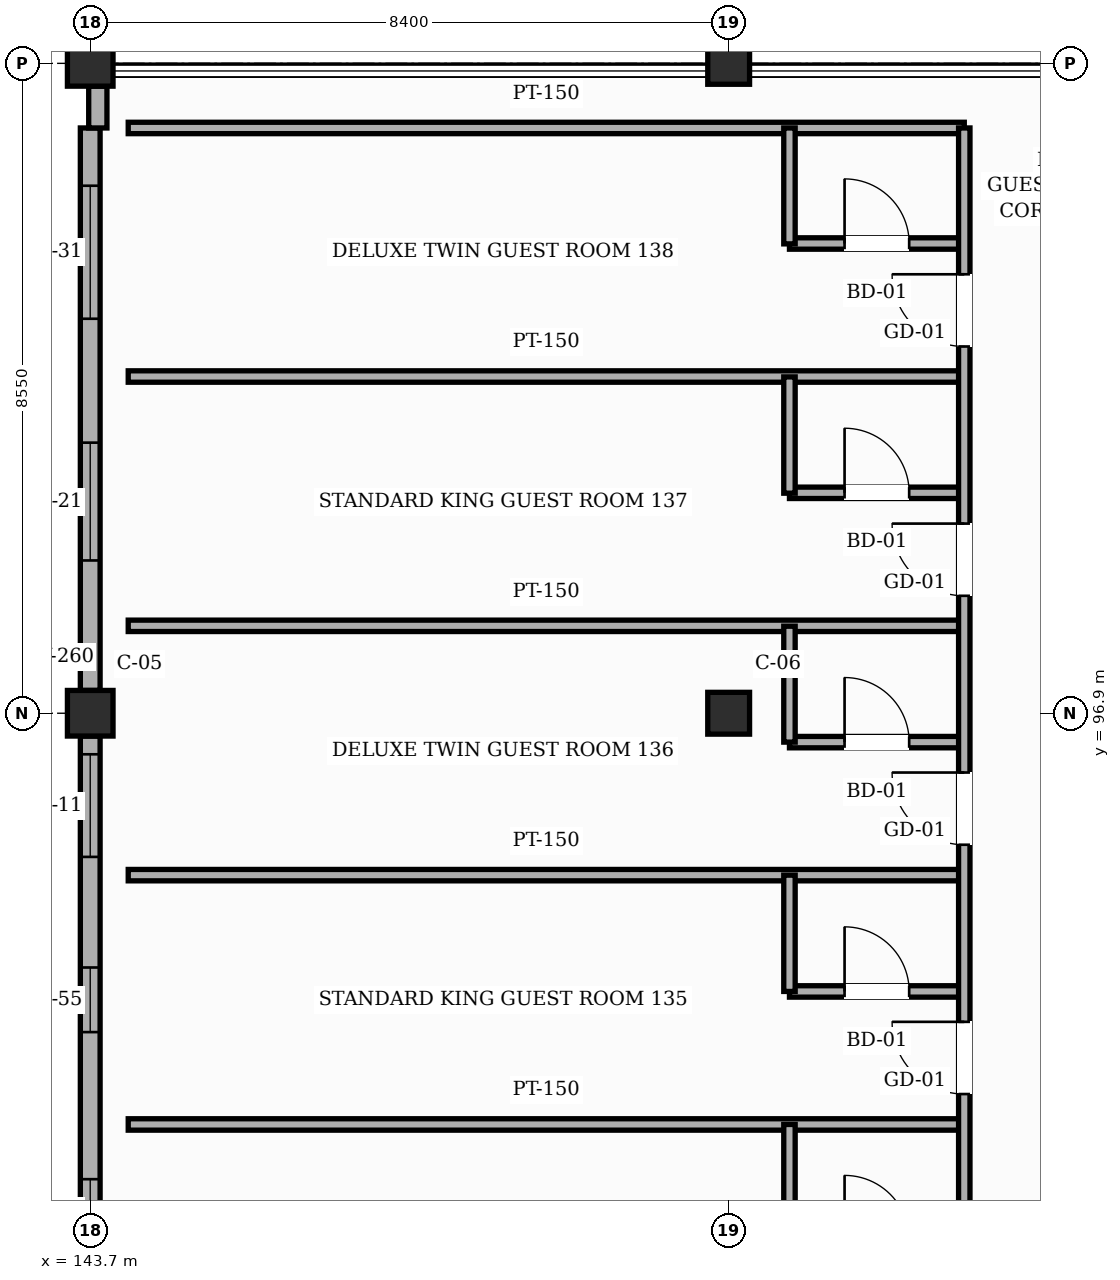
"""IFC4 building model, lengths in metres.
Left out: names, types, materials, properties, quantities, classifications, styles, units other than length and angle.
Written with IfcOpenShell. Run it as: python <this file> out.ifc"""

import sys

from ifc_helpers import new_model, si_unit, direction, frame, frame_2d, origin, origin_2d, place, context, subcontext, project, spatial, rectangle, hollow_rectangle, extrude, element, fill, save


model = new_model("IFC4")
c1 = context("Model", 3, precision=1e-05, world=origin(), true_north=direction((0.0, 1.0)))
c2 = subcontext(c1, "Body", "Model", "MODEL_VIEW")
j1 = project(units=[si_unit("LENGTHUNIT", "METRE"), si_unit("PLANEANGLEUNIT", "RADIAN")], contexts=[c1])
p1 = place(None, origin())
s1 = spatial("IfcSite", under=j1, at=p1, CompositionType="ELEMENT")
p2 = place(p1, origin())
s2 = spatial("IfcBuilding", under=s1, at=p2, CompositionType="ELEMENT")
p3 = place(p2, frame((0.0, 0.0, 28.2)))
s3 = spatial("IfcBuildingStorey", under=s2, at=p3, CompositionType="ELEMENT", Elevation=28.2)
p4 = place(p3, frame((143.7, 96.9, 0.0), z_axis=(0.0, 0.0, 1.0), x_axis=(1.0, 0.0, 0.0)))
e1 = element("IfcColumn", 1, at=p4, inside=s3, PredefinedType="COLUMN", context=c2, shape_type="SweptSolid", body=[
    extrude(hollow_rectangle(XDim=0.6, YDim=0.6, WallThickness=0.025, InnerFilletRadius=0.025, OuterFilletRadius=0.05, at=origin_2d()), origin(), (0.0, 0.0, 1.0), 3.6),
])
p5 = place(p3, frame((143.7, 105.45, 0.0), z_axis=(0.0, 0.0, 1.0), x_axis=(1.0, 0.0, 0.0)))
e2 = element("IfcColumn", 2, at=p5, inside=s3, PredefinedType="COLUMN", context=c2, shape_type="SweptSolid", body=[
    extrude(hollow_rectangle(XDim=0.6, YDim=0.6, WallThickness=0.025, InnerFilletRadius=0.025, OuterFilletRadius=0.05, at=origin_2d()), origin(), (0.0, 0.0, 1.0), 3.38),
])
p6 = place(p3, frame((152.1, 96.9, 0.0), z_axis=(0.0, 0.0, 1.0), x_axis=(1.0, 0.0, 0.0)))
e3 = element("IfcColumn", 3, at=p6, inside=s3, PredefinedType="COLUMN", context=c2, shape_type="SweptSolid", body=[
    extrude(hollow_rectangle(XDim=0.55, YDim=0.55, WallThickness=0.022, InnerFilletRadius=0.022, OuterFilletRadius=0.044, at=origin_2d()), origin(), (0.0, 0.0, 1.0), 3.6),
])
p7 = place(p3, frame((152.1, 105.45, 0.0), z_axis=(0.0, 0.0, 1.0), x_axis=(1.0, 0.0, 0.0)))
e4 = element("IfcColumn", 4, at=p7, inside=s3, PredefinedType="COLUMN", context=c2, shape_type="SweptSolid", body=[
    extrude(hollow_rectangle(XDim=0.55, YDim=0.55, WallThickness=0.022, InnerFilletRadius=0.022, OuterFilletRadius=0.044, at=origin_2d()), origin(), (0.0, 0.0, 1.0), 3.38),
])
p8 = place(p3, frame((143.7, 89.2, 0.0), z_axis=(0.0, 0.0, 1.0), x_axis=(0.0, 1.0, 0.0)))
e5 = element("IfcWall", 5, at=p8, inside=s3, PredefinedType="SOLIDWALL", context=c2, shape_type="SweptSolid", body=[
    extrude(rectangle(XDim=7.4, YDim=0.26, at=frame_2d((3.7, 0.0))), origin(), (0.0, 0.0, 1.0), 2.805),
])
p9 = place(p8, frame((0.72, 0.0, 0.85)))
e6 = element("IfcOpeningElement", 6, at=p9, cuts=e5, PredefinedType="OPENING", context=c2, shape_type="SweptSolid", body=[
    extrude(rectangle(XDim=0.85, YDim=1.35, at=frame_2d((0.425, 0.675))), frame((0.0, 0.14, 0.0), z_axis=(0.0, -1.0, 0.0), x_axis=(1.0, 0.0, 0.0)), (0.0, 0.0, 1.0), 0.28),
])
p10 = place(p8, frame((3.505, 0.0, 0.85)))
e7 = element("IfcOpeningElement", 7, at=p10, cuts=e5, PredefinedType="OPENING", context=c2, shape_type="SweptSolid", body=[
    extrude(rectangle(XDim=0.85, YDim=1.35, at=frame_2d((0.425, 0.675))), frame((0.0, 0.14, 0.0), z_axis=(0.0, -1.0, 0.0), x_axis=(1.0, 0.0, 0.0)), (0.0, 0.0, 1.0), 0.28),
])
p11 = place(p8, frame((5.81, 0.0, 0.85)))
e8 = element("IfcOpeningElement", 8, at=p11, cuts=e5, PredefinedType="OPENING", context=c2, shape_type="SweptSolid", body=[
    extrude(rectangle(XDim=1.35, YDim=1.35, at=frame_2d((0.675, 0.675))), frame((0.0, 0.14, 0.0), z_axis=(0.0, -1.0, 0.0), x_axis=(1.0, 0.0, 0.0)), (0.0, 0.0, 1.0), 0.28),
])
p12 = place(p3, frame((143.7, 97.2, 0.0), z_axis=(0.0, 0.0, 1.0), x_axis=(0.0, 1.0, 0.0)))
e9 = element("IfcWall", 9, at=p12, inside=s3, PredefinedType="SOLIDWALL", context=c2, shape_type="SweptSolid", body=[
    extrude(rectangle(XDim=7.4, YDim=0.26, at=frame_2d((3.7, 0.0))), origin(), (0.0, 0.0, 1.0), 2.655),
])
p13 = place(p12, frame((1.71, 0.0, 0.85)))
e10 = element("IfcOpeningElement", 10, at=p13, cuts=e9, PredefinedType="OPENING", context=c2, shape_type="SweptSolid", body=[
    extrude(rectangle(XDim=1.55, YDim=1.35, at=frame_2d((0.775, 0.675))), frame((0.0, 0.14, 0.0), z_axis=(0.0, -1.0, 0.0), x_axis=(1.0, 0.0, 0.0)), (0.0, 0.0, 1.0), 0.28),
])
p14 = place(p12, frame((4.89, 0.0, 0.85)))
e11 = element("IfcOpeningElement", 11, at=p14, cuts=e9, PredefinedType="OPENING", context=c2, shape_type="SweptSolid", body=[
    extrude(rectangle(XDim=1.75, YDim=1.35, at=frame_2d((0.875, 0.675))), frame((0.0, 0.14, 0.0), z_axis=(0.0, -1.0, 0.0), x_axis=(1.0, 0.0, 0.0)), (0.0, 0.0, 1.0), 0.28),
])
p15 = place(p3, frame((143.8, 104.6, 0.0), z_axis=(0.0, 0.0, 1.0), x_axis=(0.0, 1.0, 0.0)))
e12 = element("IfcWall", 12, at=p15, inside=s3, PredefinedType="SOLIDWALL", context=c2, shape_type="SweptSolid", body=[
    extrude(rectangle(XDim=0.55, YDim=0.24, at=frame_2d((0.275, 0.0))), origin(), (0.0, 0.0, 1.0), 2.655),
])
p16 = place(p3, frame((144.2, 91.49, 0.0), z_axis=(0.0, 0.0, 1.0), x_axis=(1.0, 0.0, 0.0)))
e13 = element("IfcWall", 13, at=p16, inside=s3, PredefinedType="PARTITIONING", context=c2, shape_type="SweptSolid", body=[
    extrude(rectangle(XDim=11.0, YDim=0.15, at=frame_2d((5.5, 0.0))), origin(), (0.0, 0.0, 1.0), 3.365),
])
p17 = place(p3, frame((152.9, 93.24, 0.0), z_axis=(0.0, 0.0, 1.0), x_axis=(1.0, 0.0, 0.0)))
e14 = element("IfcWall", 14, at=p17, inside=s3, PredefinedType="PARTITIONING", context=c2, shape_type="SweptSolid", body=[
    extrude(rectangle(XDim=2.3, YDim=0.15, at=frame_2d((1.15, 0.0))), origin(), (0.0, 0.0, 1.0), 3.365),
])
p18 = place(p17, frame((0.725, 0.0, 0.0)))
e15 = element("IfcOpeningElement", 15, at=p18, cuts=e14, PredefinedType="OPENING", context=c2, shape_type="SweptSolid", body=[
    extrude(rectangle(XDim=0.85, YDim=2.1, at=frame_2d((0.425, 1.05))), frame((0.0, 0.085, 0.0), z_axis=(0.0, -1.0, 0.0), x_axis=(1.0, 0.0, 0.0)), (0.0, 0.0, 1.0), 0.17),
])
p19 = place(p3, frame((144.2, 94.77, 0.0), z_axis=(0.0, 0.0, 1.0), x_axis=(1.0, 0.0, 0.0)))
e16 = element("IfcWall", 16, at=p19, inside=s3, PredefinedType="PARTITIONING", context=c2, shape_type="SweptSolid", body=[
    extrude(rectangle(XDim=11.0, YDim=0.15, at=frame_2d((5.5, 0.0))), origin(), (0.0, 0.0, 1.0), 3.365),
])
p20 = place(p3, frame((152.9, 96.52, 0.0), z_axis=(0.0, 0.0, 1.0), x_axis=(1.0, 0.0, 0.0)))
e17 = element("IfcWall", 17, at=p20, inside=s3, PredefinedType="PARTITIONING", context=c2, shape_type="SweptSolid", body=[
    extrude(rectangle(XDim=2.3, YDim=0.15, at=frame_2d((1.15, 0.0))), origin(), (0.0, 0.0, 1.0), 3.365),
])
p21 = place(p20, frame((0.725, 0.0, 0.0)))
e18 = element("IfcOpeningElement", 18, at=p21, cuts=e17, PredefinedType="OPENING", context=c2, shape_type="SweptSolid", body=[
    extrude(rectangle(XDim=0.85, YDim=2.1, at=frame_2d((0.425, 1.05))), frame((0.0, 0.085, 0.0), z_axis=(0.0, -1.0, 0.0), x_axis=(1.0, 0.0, 0.0)), (0.0, 0.0, 1.0), 0.17),
])
p22 = place(p3, frame((144.2, 98.05, 0.0), z_axis=(0.0, 0.0, 1.0), x_axis=(1.0, 0.0, 0.0)))
e19 = element("IfcWall", 19, at=p22, inside=s3, PredefinedType="PARTITIONING", context=c2, shape_type="SweptSolid", body=[
    extrude(rectangle(XDim=11.0, YDim=0.15, at=frame_2d((5.5, 0.0))), origin(), (0.0, 0.0, 1.0), 3.365),
])
p23 = place(p3, frame((152.9, 99.8, 0.0), z_axis=(0.0, 0.0, 1.0), x_axis=(1.0, 0.0, 0.0)))
e20 = element("IfcWall", 20, at=p23, inside=s3, PredefinedType="PARTITIONING", context=c2, shape_type="SweptSolid", body=[
    extrude(rectangle(XDim=2.3, YDim=0.15, at=frame_2d((1.15, 0.0))), origin(), (0.0, 0.0, 1.0), 3.365),
])
p24 = place(p23, frame((0.725, 0.0, 0.0)))
e21 = element("IfcOpeningElement", 21, at=p24, cuts=e20, PredefinedType="OPENING", context=c2, shape_type="SweptSolid", body=[
    extrude(rectangle(XDim=0.85, YDim=2.1, at=frame_2d((0.425, 1.05))), frame((0.0, 0.085, 0.0), z_axis=(0.0, -1.0, 0.0), x_axis=(1.0, 0.0, 0.0)), (0.0, 0.0, 1.0), 0.17),
])
p25 = place(p3, frame((144.2, 101.33, 0.0), z_axis=(0.0, 0.0, 1.0), x_axis=(1.0, 0.0, 0.0)))
e22 = element("IfcWall", 22, at=p25, inside=s3, PredefinedType="PARTITIONING", context=c2, shape_type="SweptSolid", body=[
    extrude(rectangle(XDim=11.0, YDim=0.15, at=frame_2d((5.5, 0.0))), origin(), (0.0, 0.0, 1.0), 3.005),
])
p26 = place(p3, frame((152.9, 103.08, 0.0), z_axis=(0.0, 0.0, 1.0), x_axis=(1.0, 0.0, 0.0)))
e23 = element("IfcWall", 23, at=p26, inside=s3, PredefinedType="PARTITIONING", context=c2, shape_type="SweptSolid", body=[
    extrude(rectangle(XDim=2.3, YDim=0.15, at=frame_2d((1.15, 0.0))), origin(), (0.0, 0.0, 1.0), 3.365),
])
p27 = place(p26, frame((0.725, 0.0, 0.0)))
e24 = element("IfcOpeningElement", 24, at=p27, cuts=e23, PredefinedType="OPENING", context=c2, shape_type="SweptSolid", body=[
    extrude(rectangle(XDim=0.85, YDim=2.1, at=frame_2d((0.425, 1.05))), frame((0.0, 0.085, 0.0), z_axis=(0.0, -1.0, 0.0), x_axis=(1.0, 0.0, 0.0)), (0.0, 0.0, 1.0), 0.17),
])
p28 = place(p3, frame((144.2, 104.6, 0.0), z_axis=(0.0, 0.0, 1.0), x_axis=(1.0, 0.0, 0.0)))
e25 = element("IfcWall", 25, at=p28, inside=s3, PredefinedType="PARTITIONING", context=c2, shape_type="SweptSolid", body=[
    extrude(rectangle(XDim=11.0, YDim=0.15, at=frame_2d((5.5, 0.0))), origin(), (0.0, 0.0, 1.0), 3.365),
])
p29 = place(p3, frame((152.9, 89.965, 0.0), z_axis=(0.0, 0.0, 1.0), x_axis=(0.0, 1.0, 0.0)))
e26 = element("IfcWall", 26, at=p29, inside=s3, PredefinedType="PARTITIONING", context=c2, shape_type="SweptSolid", body=[
    extrude(rectangle(XDim=1.525, YDim=0.15, at=frame_2d((0.762, 0.0))), origin(), (0.0, 0.0, 1.0), 3.365),
])
p30 = place(p3, frame((152.9, 93.24, 0.0), z_axis=(0.0, 0.0, 1.0), x_axis=(0.0, 1.0, 0.0)))
e27 = element("IfcWall", 27, at=p30, inside=s3, PredefinedType="PARTITIONING", context=c2, shape_type="SweptSolid", body=[
    extrude(rectangle(XDim=1.53, YDim=0.15, at=frame_2d((0.765, 0.0))), origin(), (0.0, 0.0, 1.0), 3.365),
])
p31 = place(p3, frame((152.9, 96.52, 0.0), z_axis=(0.0, 0.0, 1.0), x_axis=(0.0, 1.0, 0.0)))
e28 = element("IfcWall", 28, at=p31, inside=s3, PredefinedType="PARTITIONING", context=c2, shape_type="SweptSolid", body=[
    extrude(rectangle(XDim=1.525, YDim=0.15, at=frame_2d((0.762, 0.0))), origin(), (0.0, 0.0, 1.0), 3.365),
])
p32 = place(p3, frame((152.9, 99.795, 0.0), z_axis=(0.0, 0.0, 1.0), x_axis=(0.0, 1.0, 0.0)))
e29 = element("IfcWall", 29, at=p32, inside=s3, PredefinedType="PARTITIONING", context=c2, shape_type="SweptSolid", body=[
    extrude(rectangle(XDim=1.53, YDim=0.15, at=frame_2d((0.765, 0.0))), origin(), (0.0, 0.0, 1.0), 3.365),
])
p33 = place(p3, frame((152.9, 103.075, 0.0), z_axis=(0.0, 0.0, 1.0), x_axis=(0.0, 1.0, 0.0)))
e30 = element("IfcWall", 30, at=p33, inside=s3, PredefinedType="PARTITIONING", context=c2, shape_type="SweptSolid", body=[
    extrude(rectangle(XDim=1.525, YDim=0.15, at=frame_2d((0.763, 0.0))), origin(), (0.0, 0.0, 1.0), 3.365),
])
p34 = place(p3, frame((155.2, 62.0, 0.0), z_axis=(0.0, 0.0, 1.0), x_axis=(0.0, 1.0, 0.0)))
e31 = element("IfcWall", 31, at=p34, inside=s3, PredefinedType="PARTITIONING", context=c2, shape_type="SweptSolid", body=[
    extrude(rectangle(XDim=42.6, YDim=0.15, at=frame_2d((21.3, 0.0))), origin(), (0.0, 0.0, 1.0), 3.365),
])
p35 = place(p34, frame((0.325, 0.0, 0.0)))
e32 = element("IfcOpeningElement", 32, at=p35, cuts=e31, PredefinedType="OPENING", context=c2, shape_type="SweptSolid", body=[
    extrude(rectangle(XDim=1.1, YDim=2.2, at=frame_2d((0.55, 1.1))), frame((0.0, 0.085, 0.0), z_axis=(0.0, -1.0, 0.0), x_axis=(1.0, 0.0, 0.0)), (0.0, 0.0, 1.0), 0.17),
])
p36 = place(p34, frame((3.675, 0.0, 0.0)))
e33 = element("IfcOpeningElement", 33, at=p36, cuts=e31, PredefinedType="OPENING", context=c2, shape_type="SweptSolid", body=[
    extrude(rectangle(XDim=0.95, YDim=2.15, at=frame_2d((0.475, 1.075))), frame((0.0, 0.085, 0.0), z_axis=(0.0, -1.0, 0.0), x_axis=(1.0, 0.0, 0.0)), (0.0, 0.0, 1.0), 0.17),
])
p37 = place(p34, frame((6.955, 0.0, 0.0)))
e34 = element("IfcOpeningElement", 34, at=p37, cuts=e31, PredefinedType="OPENING", context=c2, shape_type="SweptSolid", body=[
    extrude(rectangle(XDim=0.95, YDim=2.15, at=frame_2d((0.475, 1.075))), frame((0.0, 0.085, 0.0), z_axis=(0.0, -1.0, 0.0), x_axis=(1.0, 0.0, 0.0)), (0.0, 0.0, 1.0), 0.17),
])
p38 = place(p34, frame((10.23, 0.0, 0.0)))
e35 = element("IfcOpeningElement", 35, at=p38, cuts=e31, PredefinedType="OPENING", context=c2, shape_type="SweptSolid", body=[
    extrude(rectangle(XDim=0.95, YDim=2.15, at=frame_2d((0.475, 1.075))), frame((0.0, 0.085, 0.0), z_axis=(0.0, -1.0, 0.0), x_axis=(1.0, 0.0, 0.0)), (0.0, 0.0, 1.0), 0.17),
])
p39 = place(p34, frame((13.51, 0.0, 0.0)))
e36 = element("IfcOpeningElement", 36, at=p39, cuts=e31, PredefinedType="OPENING", context=c2, shape_type="SweptSolid", body=[
    extrude(rectangle(XDim=0.95, YDim=2.15, at=frame_2d((0.475, 1.075))), frame((0.0, 0.085, 0.0), z_axis=(0.0, -1.0, 0.0), x_axis=(1.0, 0.0, 0.0)), (0.0, 0.0, 1.0), 0.17),
])
p40 = place(p34, frame((16.785, 0.0, 0.0)))
e37 = element("IfcOpeningElement", 37, at=p40, cuts=e31, PredefinedType="OPENING", context=c2, shape_type="SweptSolid", body=[
    extrude(rectangle(XDim=0.95, YDim=2.15, at=frame_2d((0.475, 1.075))), frame((0.0, 0.085, 0.0), z_axis=(0.0, -1.0, 0.0), x_axis=(1.0, 0.0, 0.0)), (0.0, 0.0, 1.0), 0.17),
])
p41 = place(p34, frame((20.06, 0.0, 0.0)))
e38 = element("IfcOpeningElement", 38, at=p41, cuts=e31, PredefinedType="OPENING", context=c2, shape_type="SweptSolid", body=[
    extrude(rectangle(XDim=0.95, YDim=2.15, at=frame_2d((0.475, 1.075))), frame((0.0, 0.085, 0.0), z_axis=(0.0, -1.0, 0.0), x_axis=(1.0, 0.0, 0.0)), (0.0, 0.0, 1.0), 0.17),
])
p42 = place(p34, frame((23.34, 0.0, 0.0)))
e39 = element("IfcOpeningElement", 39, at=p42, cuts=e31, PredefinedType="OPENING", context=c2, shape_type="SweptSolid", body=[
    extrude(rectangle(XDim=0.95, YDim=2.15, at=frame_2d((0.475, 1.075))), frame((0.0, 0.085, 0.0), z_axis=(0.0, -1.0, 0.0), x_axis=(1.0, 0.0, 0.0)), (0.0, 0.0, 1.0), 0.17),
])
p43 = place(p34, frame((26.615, 0.0, 0.0)))
e40 = element("IfcOpeningElement", 40, at=p43, cuts=e31, PredefinedType="OPENING", context=c2, shape_type="SweptSolid", body=[
    extrude(rectangle(XDim=0.95, YDim=2.15, at=frame_2d((0.475, 1.075))), frame((0.0, 0.085, 0.0), z_axis=(0.0, -1.0, 0.0), x_axis=(1.0, 0.0, 0.0)), (0.0, 0.0, 1.0), 0.17),
])
p44 = place(p34, frame((29.89, 0.0, 0.0)))
e41 = element("IfcOpeningElement", 41, at=p44, cuts=e31, PredefinedType="OPENING", context=c2, shape_type="SweptSolid", body=[
    extrude(rectangle(XDim=0.95, YDim=2.15, at=frame_2d((0.475, 1.075))), frame((0.0, 0.085, 0.0), z_axis=(0.0, -1.0, 0.0), x_axis=(1.0, 0.0, 0.0)), (0.0, 0.0, 1.0), 0.17),
])
p45 = place(p34, frame((33.17, 0.0, 0.0)))
e42 = element("IfcOpeningElement", 42, at=p45, cuts=e31, PredefinedType="OPENING", context=c2, shape_type="SweptSolid", body=[
    extrude(rectangle(XDim=0.95, YDim=2.15, at=frame_2d((0.475, 1.075))), frame((0.0, 0.085, 0.0), z_axis=(0.0, -1.0, 0.0), x_axis=(1.0, 0.0, 0.0)), (0.0, 0.0, 1.0), 0.17),
])
p46 = place(p34, frame((36.445, 0.0, 0.0)))
e43 = element("IfcOpeningElement", 43, at=p46, cuts=e31, PredefinedType="OPENING", context=c2, shape_type="SweptSolid", body=[
    extrude(rectangle(XDim=0.95, YDim=2.15, at=frame_2d((0.475, 1.075))), frame((0.0, 0.085, 0.0), z_axis=(0.0, -1.0, 0.0), x_axis=(1.0, 0.0, 0.0)), (0.0, 0.0, 1.0), 0.17),
])
p47 = place(p34, frame((39.725, 0.0, 0.0)))
e44 = element("IfcOpeningElement", 44, at=p47, cuts=e31, PredefinedType="OPENING", context=c2, shape_type="SweptSolid", body=[
    extrude(rectangle(XDim=0.95, YDim=2.15, at=frame_2d((0.475, 1.075))), frame((0.0, 0.085, 0.0), z_axis=(0.0, -1.0, 0.0), x_axis=(1.0, 0.0, 0.0)), (0.0, 0.0, 1.0), 0.17),
])
p48 = place(p9, origin())
e45 = element("IfcWindow", 45, at=p48, inside=s3, PartitioningType="SINGLE_PANEL", PredefinedType="WINDOW", context=c2, shape_type="SweptSolid", body=[
    extrude(rectangle(XDim=0.85, YDim=1.35, at=frame_2d((0.425, 0.675))), frame((0.0, 0.03, 0.0), z_axis=(0.0, -1.0, 0.0), x_axis=(1.0, 0.0, 0.0)), (0.0, 0.0, 1.0), 0.06),
])
fill(e6, e45)
p49 = place(p10, origin())
e46 = element("IfcWindow", 46, at=p49, inside=s3, PartitioningType="SINGLE_PANEL", PredefinedType="WINDOW", context=c2, shape_type="SweptSolid", body=[
    extrude(rectangle(XDim=0.85, YDim=1.35, at=frame_2d((0.425, 0.675))), frame((0.0, 0.03, 0.0), z_axis=(0.0, -1.0, 0.0), x_axis=(1.0, 0.0, 0.0)), (0.0, 0.0, 1.0), 0.06),
])
fill(e7, e46)
p50 = place(p11, origin())
e47 = element("IfcWindow", 47, at=p50, inside=s3, PartitioningType="SINGLE_PANEL", PredefinedType="WINDOW", context=c2, shape_type="SweptSolid", body=[
    extrude(rectangle(XDim=1.35, YDim=1.35, at=frame_2d((0.675, 0.675))), frame((0.0, 0.03, 0.0), z_axis=(0.0, -1.0, 0.0), x_axis=(1.0, 0.0, 0.0)), (0.0, 0.0, 1.0), 0.06),
])
fill(e8, e47)
p51 = place(p13, origin())
e48 = element("IfcWindow", 48, at=p51, inside=s3, PartitioningType="SINGLE_PANEL", PredefinedType="WINDOW", context=c2, shape_type="SweptSolid", body=[
    extrude(rectangle(XDim=1.55, YDim=1.35, at=frame_2d((0.775, 0.675))), frame((0.0, 0.03, 0.0), z_axis=(0.0, -1.0, 0.0), x_axis=(1.0, 0.0, 0.0)), (0.0, 0.0, 1.0), 0.06),
])
fill(e10, e48)
p52 = place(p14, origin())
e49 = element("IfcWindow", 49, at=p52, inside=s3, PartitioningType="SINGLE_PANEL", PredefinedType="WINDOW", context=c2, shape_type="SweptSolid", body=[
    extrude(rectangle(XDim=1.75, YDim=1.35, at=frame_2d((0.875, 0.675))), frame((0.0, 0.03, 0.0), z_axis=(0.0, -1.0, 0.0), x_axis=(1.0, 0.0, 0.0)), (0.0, 0.0, 1.0), 0.06),
])
fill(e11, e49)
p53 = place(p44, origin())
e50 = element("IfcDoor", 50, at=p53, inside=s3, OperationType="SINGLE_SWING_RIGHT", PredefinedType="DOOR", context=c2, shape_type="SweptSolid", body=[
    extrude(rectangle(XDim=0.95, YDim=2.15, at=frame_2d((0.475, 1.075))), frame((0.0, 0.025, 0.0), z_axis=(0.0, -1.0, 0.0), x_axis=(1.0, 0.0, 0.0)), (0.0, 0.0, 1.0), 0.05),
])
fill(e41, e50)
p54 = place(p18, origin())
e51 = element("IfcDoor", 51, at=p54, inside=s3, OperationType="SINGLE_SWING_LEFT", PredefinedType="DOOR", context=c2, shape_type="SweptSolid", body=[
    extrude(rectangle(XDim=0.85, YDim=2.1, at=frame_2d((0.425, 1.05))), frame((0.0, 0.025, 0.0), z_axis=(0.0, -1.0, 0.0), x_axis=(1.0, 0.0, 0.0)), (0.0, 0.0, 1.0), 0.05),
])
fill(e15, e51)
p55 = place(p45, origin())
e52 = element("IfcDoor", 52, at=p55, inside=s3, OperationType="SINGLE_SWING_RIGHT", PredefinedType="DOOR", context=c2, shape_type="SweptSolid", body=[
    extrude(rectangle(XDim=0.95, YDim=2.15, at=frame_2d((0.475, 1.075))), frame((0.0, 0.025, 0.0), z_axis=(0.0, -1.0, 0.0), x_axis=(1.0, 0.0, 0.0)), (0.0, 0.0, 1.0), 0.05),
])
fill(e42, e52)
p56 = place(p21, origin())
e53 = element("IfcDoor", 53, at=p56, inside=s3, OperationType="SINGLE_SWING_LEFT", PredefinedType="DOOR", context=c2, shape_type="SweptSolid", body=[
    extrude(rectangle(XDim=0.85, YDim=2.1, at=frame_2d((0.425, 1.05))), frame((0.0, 0.025, 0.0), z_axis=(0.0, -1.0, 0.0), x_axis=(1.0, 0.0, 0.0)), (0.0, 0.0, 1.0), 0.05),
])
fill(e18, e53)
p57 = place(p46, origin())
e54 = element("IfcDoor", 54, at=p57, inside=s3, OperationType="SINGLE_SWING_RIGHT", PredefinedType="DOOR", context=c2, shape_type="SweptSolid", body=[
    extrude(rectangle(XDim=0.95, YDim=2.15, at=frame_2d((0.475, 1.075))), frame((0.0, 0.025, 0.0), z_axis=(0.0, -1.0, 0.0), x_axis=(1.0, 0.0, 0.0)), (0.0, 0.0, 1.0), 0.05),
])
fill(e43, e54)
p58 = place(p24, origin())
e55 = element("IfcDoor", 55, at=p58, inside=s3, OperationType="SINGLE_SWING_LEFT", PredefinedType="DOOR", context=c2, shape_type="SweptSolid", body=[
    extrude(rectangle(XDim=0.85, YDim=2.1, at=frame_2d((0.425, 1.05))), frame((0.0, 0.025, 0.0), z_axis=(0.0, -1.0, 0.0), x_axis=(1.0, 0.0, 0.0)), (0.0, 0.0, 1.0), 0.05),
])
fill(e21, e55)
p59 = place(p47, origin())
e56 = element("IfcDoor", 56, at=p59, inside=s3, OperationType="SINGLE_SWING_RIGHT", PredefinedType="DOOR", context=c2, shape_type="SweptSolid", body=[
    extrude(rectangle(XDim=0.95, YDim=2.15, at=frame_2d((0.475, 1.075))), frame((0.0, 0.025, 0.0), z_axis=(0.0, -1.0, 0.0), x_axis=(1.0, 0.0, 0.0)), (0.0, 0.0, 1.0), 0.05),
])
fill(e44, e56)
p60 = place(p27, origin())
e57 = element("IfcDoor", 57, at=p60, inside=s3, OperationType="SINGLE_SWING_LEFT", PredefinedType="DOOR", context=c2, shape_type="SweptSolid", body=[
    extrude(rectangle(XDim=0.85, YDim=2.1, at=frame_2d((0.425, 1.05))), frame((0.0, 0.025, 0.0), z_axis=(0.0, -1.0, 0.0), x_axis=(1.0, 0.0, 0.0)), (0.0, 0.0, 1.0), 0.05),
])
fill(e24, e57)
save(model, sys.argv[1])
